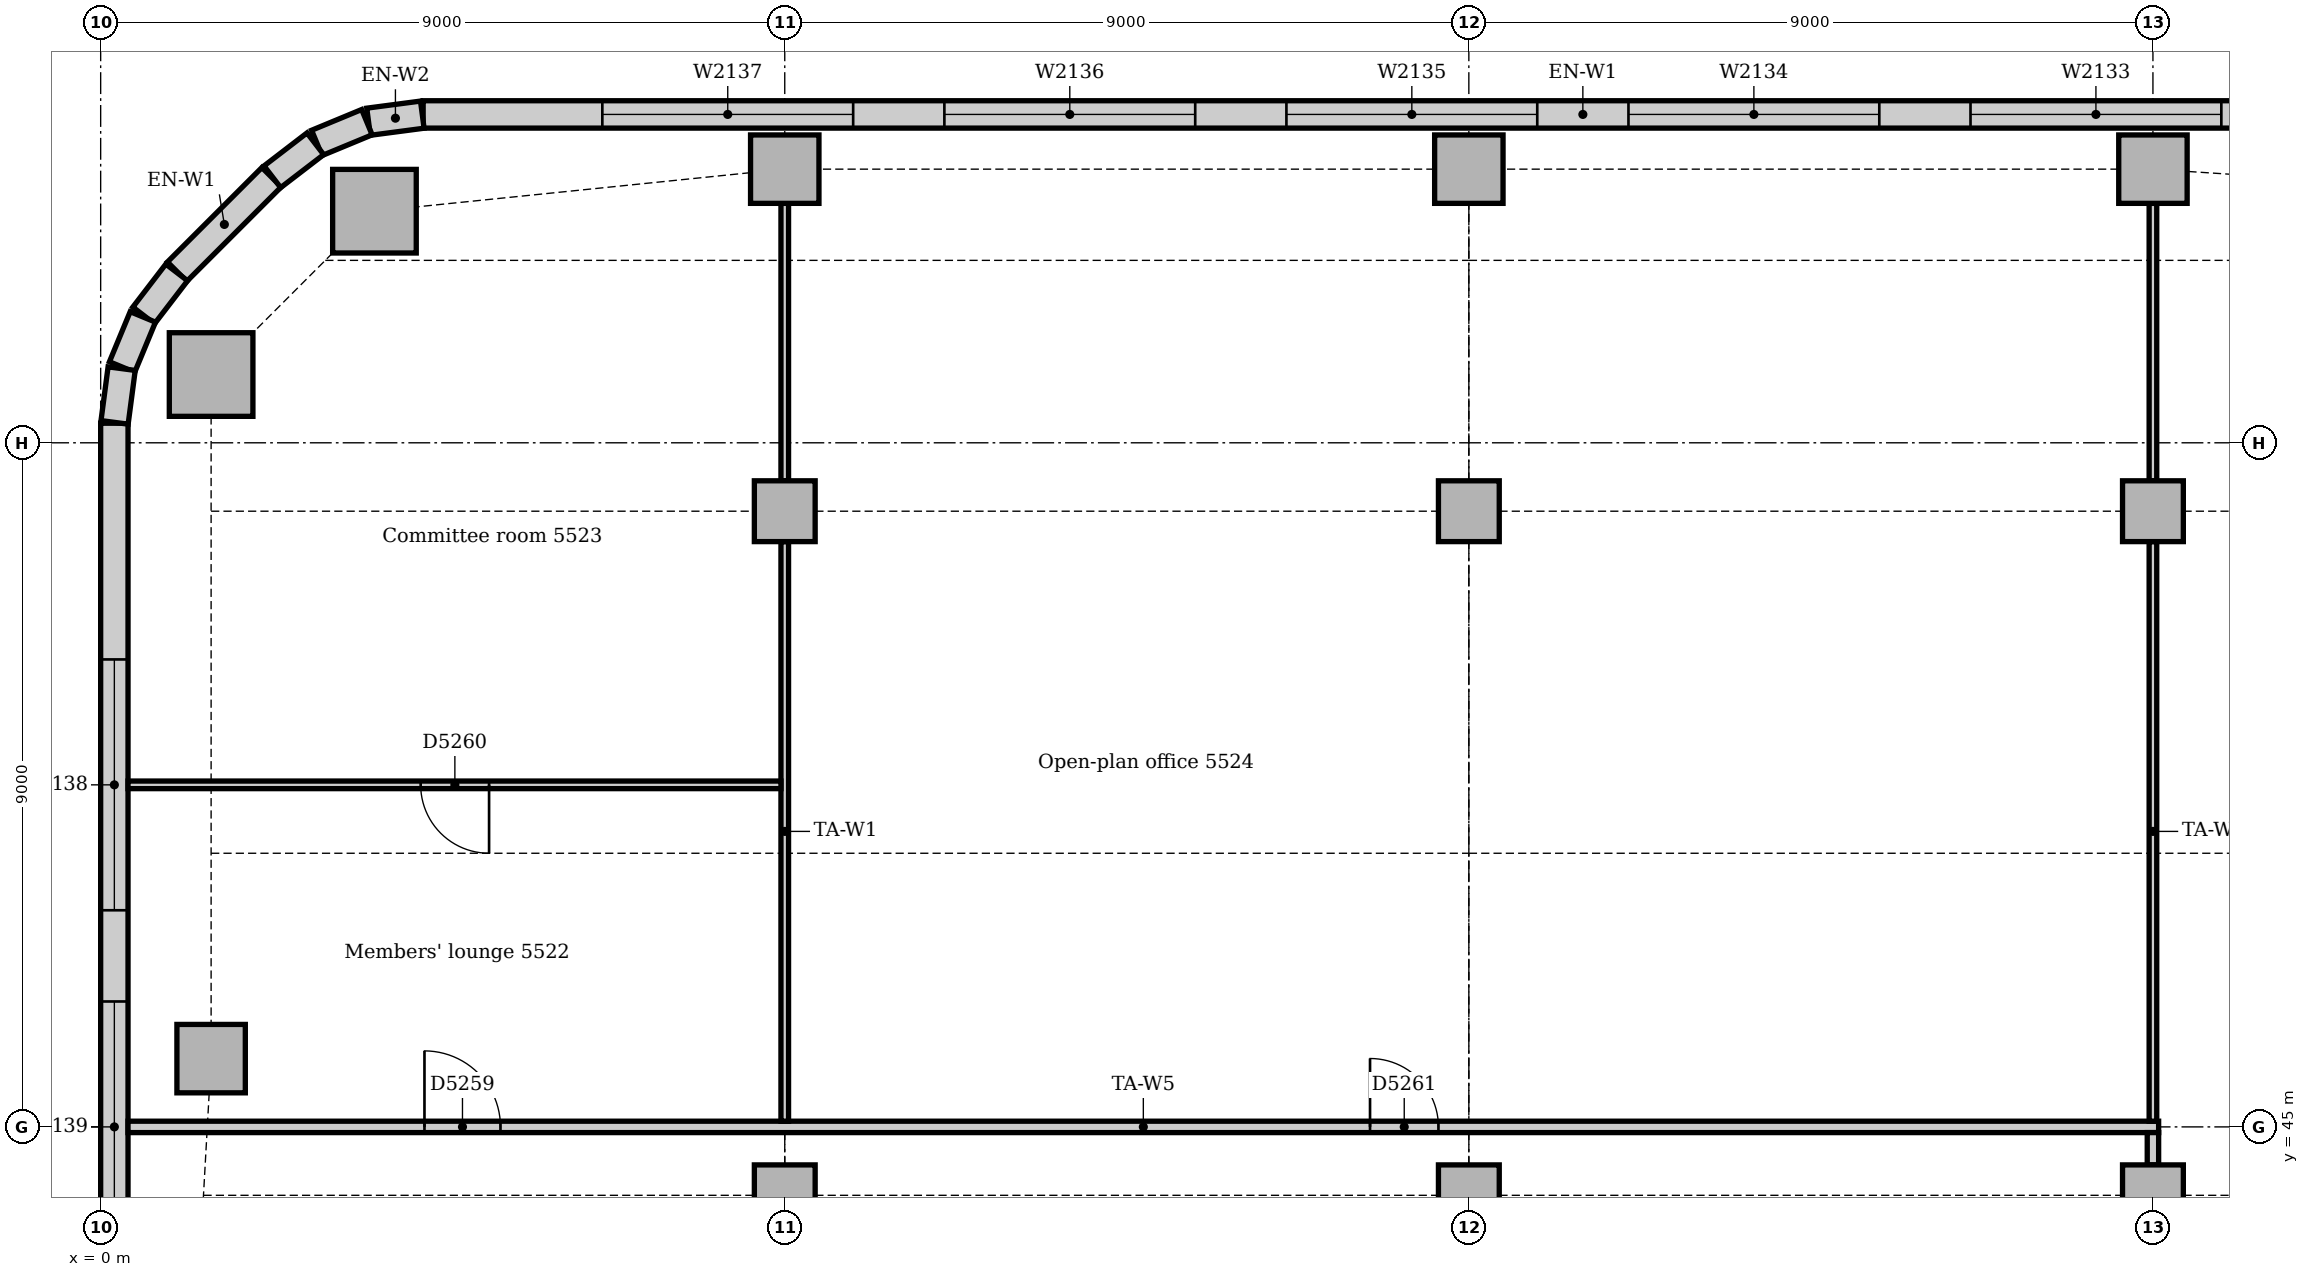
"""IFC4 building model, lengths in metres.
Left out: names, types, materials, properties, quantities, classifications, styles, units other than length and angle.
Written with IfcOpenShell. Run it as: python <this file> out.ifc"""

import sys

from ifc_helpers import new_model, si_unit, direction, frame, frame_2d, origin, origin_2d, place, context, subcontext, project, spatial, rectangle, extrude, element, fill, save


model = new_model("IFC4")
c1 = context("Model", 3, precision=1e-05, world=origin(), true_north=direction((0.0, 1.0)))
c2 = subcontext(c1, "Body", "Model", "MODEL_VIEW")
j1 = project(units=[si_unit("LENGTHUNIT", "METRE"), si_unit("PLANEANGLEUNIT", "RADIAN")], contexts=[c1])
p1 = place(None, origin())
s1 = spatial("IfcSite", under=j1, at=p1, CompositionType="ELEMENT")
p2 = place(p1, origin())
s2 = spatial("IfcBuilding", under=s1, at=p2, CompositionType="ELEMENT")
p3 = place(p2, frame((0.0, 0.0, 230.0)))
s3 = spatial("IfcBuildingStorey", under=s2, at=p3, CompositionType="ELEMENT", Elevation=230.0)
for number, where, z_axis, x_axis in (
    (1, (3.602, 57.047, 0.0), (0.0, 0.0, 1.0), (1.0, 0.0, 0.0)),
    (2, (1.453, 54.898, 0.0), (0.0, 0.0, 1.0), (1.0, 0.0, 0.0)),
):
    element("IfcColumn", number, at=place(p3, frame(where, z_axis=z_axis, x_axis=x_axis)), inside=s3, PredefinedType="COLUMN", context=c2, shape_type="SweptSolid", body=[
        extrude(rectangle(XDim=1.1, YDim=1.1, at=origin_2d()), origin(), (0.0, 0.0, 1.0), 3.85),
    ])
for number, where, z_axis, x_axis in (
    (3, (9.0, 57.6, 0.0), (0.0, 0.0, 1.0), (1.0, 0.0, 0.0)),
    (4, (18.0, 57.6, 0.0), (0.0, 0.0, 1.0), (1.0, 0.0, 0.0)),
    (5, (27.0, 57.6, 0.0), (0.0, 0.0, 1.0), (1.0, 0.0, 0.0)),
    (6, (1.453, 45.898, 0.0), (0.0, 0.0, 1.0), (1.0, 0.0, 0.0)),
):
    element("IfcColumn", number, at=place(p3, frame(where, z_axis=z_axis, x_axis=x_axis)), inside=s3, PredefinedType="COLUMN", context=c2, shape_type="SweptSolid", body=[
        extrude(rectangle(XDim=0.9, YDim=0.9, at=origin_2d()), origin(), (0.0, 0.0, 1.0), 3.85),
    ])
for number, where, z_axis, x_axis in (
    (7, (9.0, 44.1, 0.0), (0.0, 0.0, 1.0), (1.0, 0.0, 0.0)),
    (8, (9.0, 53.1, 0.0), (0.0, 0.0, 1.0), (1.0, 0.0, 0.0)),
    (9, (18.0, 44.1, 0.0), (0.0, 0.0, 1.0), (1.0, 0.0, 0.0)),
    (10, (18.0, 53.1, 0.0), (0.0, 0.0, 1.0), (1.0, 0.0, 0.0)),
    (11, (27.0, 44.1, 0.0), (0.0, 0.0, 1.0), (1.0, 0.0, 0.0)),
    (12, (27.0, 53.1, 0.0), (0.0, 0.0, 1.0), (1.0, 0.0, 0.0)),
):
    element("IfcColumn", number, at=place(p3, frame(where, z_axis=z_axis, x_axis=x_axis)), inside=s3, PredefinedType="COLUMN", context=c2, shape_type="SweptSolid", body=[
        extrude(rectangle(XDim=0.8, YDim=0.8, at=origin_2d()), origin(), (0.0, 0.0, 1.0), 3.85),
    ])
p4 = place(p3, frame((34.757, 58.32, 0.0), z_axis=(0.0, 0.0, 1.0), x_axis=(-1.0, 0.0, 0.0)))
e13 = element("IfcWall", 13, at=p4, inside=s3, PredefinedType="STANDARD", context=c2, shape_type="SweptSolid", body=[
    extrude(rectangle(XDim=30.515, YDim=0.36, at=frame_2d((15.257, 0.0))), origin(), (0.0, 0.0, 1.0), 3.85),
])
p5 = place(p4, frame((2.357, 0.0, 0.9)))
e14 = element("IfcOpeningElement", 14, at=p5, cuts=e13, PredefinedType="OPENING", context=c2, shape_type="SweptSolid", body=[
    extrude(rectangle(XDim=3.3, YDim=1.6, at=frame_2d((1.65, 0.8))), frame((0.0, 0.19, 0.0), z_axis=(0.0, -1.0, 0.0), x_axis=(1.0, 0.0, 0.0)), (0.0, 0.0, 1.0), 0.38),
])
p6 = place(p4, frame((6.857, 0.0, 0.9)))
e15 = element("IfcOpeningElement", 15, at=p6, cuts=e13, PredefinedType="OPENING", context=c2, shape_type="SweptSolid", body=[
    extrude(rectangle(XDim=3.3, YDim=1.6, at=frame_2d((1.65, 0.8))), frame((0.0, 0.19, 0.0), z_axis=(0.0, -1.0, 0.0), x_axis=(1.0, 0.0, 0.0)), (0.0, 0.0, 1.0), 0.38),
])
p7 = place(p4, frame((11.357, 0.0, 0.9)))
e16 = element("IfcOpeningElement", 16, at=p7, cuts=e13, PredefinedType="OPENING", context=c2, shape_type="SweptSolid", body=[
    extrude(rectangle(XDim=3.3, YDim=1.6, at=frame_2d((1.65, 0.8))), frame((0.0, 0.19, 0.0), z_axis=(0.0, -1.0, 0.0), x_axis=(1.0, 0.0, 0.0)), (0.0, 0.0, 1.0), 0.38),
])
p8 = place(p4, frame((15.857, 0.0, 0.9)))
e17 = element("IfcOpeningElement", 17, at=p8, cuts=e13, PredefinedType="OPENING", context=c2, shape_type="SweptSolid", body=[
    extrude(rectangle(XDim=3.3, YDim=1.6, at=frame_2d((1.65, 0.8))), frame((0.0, 0.19, 0.0), z_axis=(0.0, -1.0, 0.0), x_axis=(1.0, 0.0, 0.0)), (0.0, 0.0, 1.0), 0.38),
])
p9 = place(p4, frame((20.357, 0.0, 0.9)))
e18 = element("IfcOpeningElement", 18, at=p9, cuts=e13, PredefinedType="OPENING", context=c2, shape_type="SweptSolid", body=[
    extrude(rectangle(XDim=3.3, YDim=1.6, at=frame_2d((1.65, 0.8))), frame((0.0, 0.19, 0.0), z_axis=(0.0, -1.0, 0.0), x_axis=(1.0, 0.0, 0.0)), (0.0, 0.0, 1.0), 0.38),
])
p10 = place(p4, frame((24.857, 0.0, 0.9)))
e19 = element("IfcOpeningElement", 19, at=p10, cuts=e13, PredefinedType="OPENING", context=c2, shape_type="SweptSolid", body=[
    extrude(rectangle(XDim=3.3, YDim=1.6, at=frame_2d((1.65, 0.8))), frame((0.0, 0.19, 0.0), z_axis=(0.0, -1.0, 0.0), x_axis=(1.0, 0.0, 0.0)), (0.0, 0.0, 1.0), 0.38),
])
p11 = place(p3, frame((2.249, 57.494, 0.0), z_axis=(0.0, 0.0, 1.0), x_axis=(-0.707106781187, -0.707106781187, 0.0)))
e20 = element("IfcWall", 20, at=p11, inside=s3, PredefinedType="STANDARD", context=c2, shape_type="SweptSolid", body=[
    extrude(rectangle(XDim=1.757, YDim=0.36, at=frame_2d((0.879, 0.0))), origin(), (0.0, 0.0, 1.0), 3.85),
])
p12 = place(p3, frame((0.18, 54.257, 0.0), z_axis=(0.0, 0.0, 1.0), x_axis=(0.0, -1.0, 0.0)))
e21 = element("IfcWall", 21, at=p12, inside=s3, PredefinedType="STANDARD", context=c2, shape_type="SweptSolid", body=[
    extrude(rectangle(XDim=12.257, YDim=0.36, at=frame_2d((6.129, 0.0))), origin(), (0.0, 0.0, 1.0), 3.85),
])
p13 = place(p12, frame((3.107, 0.0, 0.9)))
e22 = element("IfcOpeningElement", 22, at=p13, cuts=e21, PredefinedType="OPENING", context=c2, shape_type="SweptSolid", body=[
    extrude(rectangle(XDim=3.3, YDim=1.6, at=frame_2d((1.65, 0.8))), frame((0.0, 0.19, 0.0), z_axis=(0.0, -1.0, 0.0), x_axis=(1.0, 0.0, 0.0)), (0.0, 0.0, 1.0), 0.38),
])
p14 = place(p12, frame((7.607, 0.0, 0.9)))
e23 = element("IfcOpeningElement", 23, at=p14, cuts=e21, PredefinedType="OPENING", context=c2, shape_type="SweptSolid", body=[
    extrude(rectangle(XDim=3.3, YDim=1.6, at=frame_2d((1.65, 0.8))), frame((0.0, 0.19, 0.0), z_axis=(0.0, -1.0, 0.0), x_axis=(1.0, 0.0, 0.0)), (0.0, 0.0, 1.0), 0.38),
])
for number, where, z_axis, x_axis in (
    (24, (4.231, 58.317, 0.0), (0.0, 0.0, 1.0), (-0.991, -0.131, 0.0)),
    (25, (3.503, 58.218, 0.0), (0.0, 0.0, 1.0), (-0.924, -0.383, 0.0)),
):
    element("IfcWall", number, at=place(p3, frame(where, z_axis=z_axis, x_axis=x_axis)), inside=s3, PredefinedType="STANDARD", context=c2, shape_type="SweptSolid", body=[
        extrude(rectangle(XDim=0.713, YDim=0.36, at=frame_2d((0.356, 0.0))), origin(), (0.0, 0.0, 1.0), 3.85),
    ])
for number, where, z_axis, x_axis in (
    (26, (2.825, 57.934, 0.0), (0.0, 0.0, 1.0), (-0.793, -0.609, 0.0)),
    (27, (1.0, 56.241, 0.0), (0.0, 0.0, 1.0), (-0.609, -0.793, 0.0)),
):
    element("IfcWall", number, at=place(p3, frame(where, z_axis=z_axis, x_axis=x_axis)), inside=s3, PredefinedType="STANDARD", context=c2, shape_type="SweptSolid", body=[
        extrude(rectangle(XDim=0.713, YDim=0.36, at=frame_2d((0.357, 0.0))), origin(), (0.0, 0.0, 1.0), 3.85),
    ])
for number, where, z_axis, x_axis in (
    (28, (0.555, 55.656, 0.0), (0.0, 0.0, 1.0), (-0.383, -0.924, 0.0)),
    (29, (0.276, 54.976, 0.0), (0.0, 0.0, 1.0), (-0.131, -0.991, 0.0)),
):
    element("IfcWall", number, at=place(p3, frame(where, z_axis=z_axis, x_axis=x_axis)), inside=s3, PredefinedType="STANDARD", context=c2, shape_type="SweptSolid", body=[
        extrude(rectangle(XDim=0.713, YDim=0.36, at=frame_2d((0.356, 0.0))), origin(), (0.0, 0.0, 1.0), 3.85),
    ])
p15 = place(p3, frame((0.36, 45.0, 0.0), z_axis=(0.0, 0.0, 1.0), x_axis=(1.0, 0.0, 0.0)))
e30 = element("IfcWall", 30, at=p15, inside=s3, PredefinedType="PARTITIONING", context=c2, shape_type="SweptSolid", body=[
    extrude(rectangle(XDim=26.715, YDim=0.15, at=frame_2d((13.357, 0.0))), origin(), (0.0, 0.0, 1.0), 3.85),
])
p16 = place(p15, frame((3.9, 0.0, 0.0)))
e31 = element("IfcOpeningElement", 31, at=p16, cuts=e30, PredefinedType="OPENING", context=c2, shape_type="SweptSolid", body=[
    extrude(rectangle(XDim=1.0, YDim=2.1, at=frame_2d((0.5, 1.05))), frame((0.0, 0.085, 0.0), z_axis=(0.0, -1.0, 0.0), x_axis=(1.0, 0.0, 0.0)), (0.0, 0.0, 1.0), 0.17),
])
p17 = place(p15, frame((16.34, 0.0, 0.0)))
e32 = element("IfcOpeningElement", 32, at=p17, cuts=e30, PredefinedType="OPENING", context=c2, shape_type="SweptSolid", body=[
    extrude(rectangle(XDim=0.9, YDim=2.1, at=frame_2d((0.45, 1.05))), frame((0.0, 0.085, 0.0), z_axis=(0.0, -1.0, 0.0), x_axis=(1.0, 0.0, 0.0)), (0.0, 0.0, 1.0), 0.17),
])
p18 = place(p3, frame((27.0, 44.5, 0.0), z_axis=(0.0, 0.0, 1.0), x_axis=(0.0, 1.0, 0.0)))
e33 = element("IfcWall", 33, at=p18, inside=s3, PredefinedType="PARTITIONING", context=c2, shape_type="SweptSolid", body=[
    extrude(rectangle(XDim=0.425, YDim=0.15, at=frame_2d((0.212, 0.0))), origin(), (0.0, 0.0, 1.0), 3.85),
])
p19 = place(p3, frame((9.0, 45.075, 0.0), z_axis=(0.0, 0.0, 1.0), x_axis=(0.0, 1.0, 0.0)))
e34 = element("IfcWall", 34, at=p19, inside=s3, PredefinedType="PARTITIONING", context=c2, shape_type="SweptSolid", body=[
    extrude(rectangle(XDim=7.625, YDim=0.1, at=frame_2d((3.812, 0.0))), origin(), (0.0, 0.0, 1.0), 3.35),
])
p20 = place(p3, frame((9.0, 53.5, 0.0), z_axis=(0.0, 0.0, 1.0), x_axis=(0.0, 1.0, 0.0)))
e35 = element("IfcWall", 35, at=p20, inside=s3, PredefinedType="PARTITIONING", context=c2, shape_type="SweptSolid", body=[
    extrude(rectangle(XDim=3.65, YDim=0.1, at=frame_2d((1.825, 0.0))), origin(), (0.0, 0.0, 1.0), 3.41),
])
p21 = place(p3, frame((27.0, 45.075, 0.0), z_axis=(0.0, 0.0, 1.0), x_axis=(0.0, 1.0, 0.0)))
e36 = element("IfcWall", 36, at=p21, inside=s3, PredefinedType="PARTITIONING", context=c2, shape_type="SweptSolid", body=[
    extrude(rectangle(XDim=7.625, YDim=0.1, at=frame_2d((3.812, 0.0))), origin(), (0.0, 0.0, 1.0), 3.35),
])
p22 = place(p3, frame((27.0, 53.5, 0.0), z_axis=(0.0, 0.0, 1.0), x_axis=(0.0, 1.0, 0.0)))
e37 = element("IfcWall", 37, at=p22, inside=s3, PredefinedType="PARTITIONING", context=c2, shape_type="SweptSolid", body=[
    extrude(rectangle(XDim=3.65, YDim=0.1, at=frame_2d((1.825, 0.0))), origin(), (0.0, 0.0, 1.0), 3.41),
])
p23 = place(p3, frame((0.36, 49.5, 0.0), z_axis=(0.0, 0.0, 1.0), x_axis=(1.0, 0.0, 0.0)))
e38 = element("IfcWall", 38, at=p23, inside=s3, PredefinedType="PARTITIONING", context=c2, shape_type="SweptSolid", body=[
    extrude(rectangle(XDim=8.59, YDim=0.1, at=frame_2d((4.295, 0.0))), origin(), (0.0, 0.0, 1.0), 3.85),
])
p24 = place(p23, frame((3.85, 0.0, 0.0)))
e39 = element("IfcOpeningElement", 39, at=p24, cuts=e38, PredefinedType="OPENING", context=c2, shape_type="SweptSolid", body=[
    extrude(rectangle(XDim=0.9, YDim=2.1, at=frame_2d((0.45, 1.05))), frame((0.0, 0.06, 0.0), z_axis=(0.0, -1.0, 0.0), x_axis=(1.0, 0.0, 0.0)), (0.0, 0.0, 1.0), 0.12),
])
p25 = place(p6, origin())
e40 = element("IfcWindow", 40, at=p25, inside=s3, PartitioningType="SINGLE_PANEL", PredefinedType="WINDOW", context=c2, shape_type="SweptSolid", body=[
    extrude(rectangle(XDim=3.3, YDim=1.6, at=frame_2d((1.65, 0.8))), frame((0.0, 0.13, 0.0), z_axis=(0.0, -1.0, 0.0), x_axis=(1.0, 0.0, 0.0)), (0.0, 0.0, 1.0), 0.06),
])
fill(e15, e40)
p26 = place(p7, origin())
e41 = element("IfcWindow", 41, at=p26, inside=s3, PartitioningType="SINGLE_PANEL", PredefinedType="WINDOW", context=c2, shape_type="SweptSolid", body=[
    extrude(rectangle(XDim=3.3, YDim=1.6, at=frame_2d((1.65, 0.8))), frame((0.0, 0.13, 0.0), z_axis=(0.0, -1.0, 0.0), x_axis=(1.0, 0.0, 0.0)), (0.0, 0.0, 1.0), 0.06),
])
fill(e16, e41)
p27 = place(p8, origin())
e42 = element("IfcWindow", 42, at=p27, inside=s3, PartitioningType="SINGLE_PANEL", PredefinedType="WINDOW", context=c2, shape_type="SweptSolid", body=[
    extrude(rectangle(XDim=3.3, YDim=1.6, at=frame_2d((1.65, 0.8))), frame((0.0, 0.13, 0.0), z_axis=(0.0, -1.0, 0.0), x_axis=(1.0, 0.0, 0.0)), (0.0, 0.0, 1.0), 0.06),
])
fill(e17, e42)
p28 = place(p9, origin())
e43 = element("IfcWindow", 43, at=p28, inside=s3, PartitioningType="SINGLE_PANEL", PredefinedType="WINDOW", context=c2, shape_type="SweptSolid", body=[
    extrude(rectangle(XDim=3.3, YDim=1.6, at=frame_2d((1.65, 0.8))), frame((0.0, 0.13, 0.0), z_axis=(0.0, -1.0, 0.0), x_axis=(1.0, 0.0, 0.0)), (0.0, 0.0, 1.0), 0.06),
])
fill(e18, e43)
p29 = place(p10, origin())
e44 = element("IfcWindow", 44, at=p29, inside=s3, PartitioningType="SINGLE_PANEL", PredefinedType="WINDOW", context=c2, shape_type="SweptSolid", body=[
    extrude(rectangle(XDim=3.3, YDim=1.6, at=frame_2d((1.65, 0.8))), frame((0.0, 0.13, 0.0), z_axis=(0.0, -1.0, 0.0), x_axis=(1.0, 0.0, 0.0)), (0.0, 0.0, 1.0), 0.06),
])
fill(e19, e44)
p30 = place(p13, origin())
e45 = element("IfcWindow", 45, at=p30, inside=s3, PartitioningType="SINGLE_PANEL", PredefinedType="WINDOW", context=c2, shape_type="SweptSolid", body=[
    extrude(rectangle(XDim=3.3, YDim=1.6, at=frame_2d((1.65, 0.8))), frame((0.0, 0.13, 0.0), z_axis=(0.0, -1.0, 0.0), x_axis=(1.0, 0.0, 0.0)), (0.0, 0.0, 1.0), 0.06),
])
fill(e22, e45)
p31 = place(p14, origin())
e46 = element("IfcWindow", 46, at=p31, inside=s3, PartitioningType="SINGLE_PANEL", PredefinedType="WINDOW", context=c2, shape_type="SweptSolid", body=[
    extrude(rectangle(XDim=3.3, YDim=1.6, at=frame_2d((1.65, 0.8))), frame((0.0, 0.13, 0.0), z_axis=(0.0, -1.0, 0.0), x_axis=(1.0, 0.0, 0.0)), (0.0, 0.0, 1.0), 0.06),
])
fill(e23, e46)
p32 = place(p16, origin())
e47 = element("IfcDoor", 47, at=p32, inside=s3, OperationType="SINGLE_SWING_LEFT", PredefinedType="DOOR", context=c2, shape_type="SweptSolid", body=[
    extrude(rectangle(XDim=1.0, YDim=2.1, at=frame_2d((0.5, 1.05))), frame((0.0, 0.025, 0.0), z_axis=(0.0, -1.0, 0.0), x_axis=(1.0, 0.0, 0.0)), (0.0, 0.0, 1.0), 0.05),
])
fill(e31, e47)
p33 = place(p24, frame((0.9, 0.0, 0.0), z_axis=(0.0, 0.0, 1.0), x_axis=(-1.0, 0.0, 0.0)))
e48 = element("IfcDoor", 48, at=p33, inside=s3, OperationType="SINGLE_SWING_LEFT", PredefinedType="DOOR", context=c2, shape_type="SweptSolid", body=[
    extrude(rectangle(XDim=0.9, YDim=2.1, at=frame_2d((0.45, 1.05))), frame((0.0, 0.025, 0.0), z_axis=(0.0, -1.0, 0.0), x_axis=(1.0, 0.0, 0.0)), (0.0, 0.0, 1.0), 0.05),
])
fill(e39, e48)
p34 = place(p17, origin())
e49 = element("IfcDoor", 49, at=p34, inside=s3, OperationType="SINGLE_SWING_LEFT", PredefinedType="DOOR", context=c2, shape_type="SweptSolid", body=[
    extrude(rectangle(XDim=0.9, YDim=2.1, at=frame_2d((0.45, 1.05))), frame((0.0, 0.025, 0.0), z_axis=(0.0, -1.0, 0.0), x_axis=(1.0, 0.0, 0.0)), (0.0, 0.0, 1.0), 0.05),
])
fill(e32, e49)
save(model, sys.argv[1])
